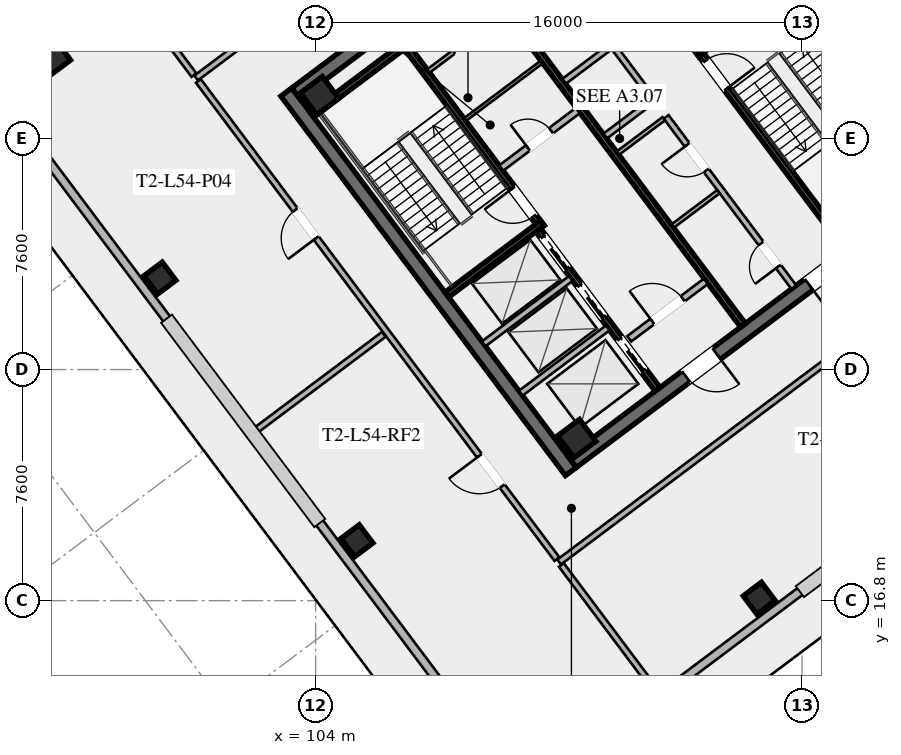
"""IFC4 building model, lengths in metres.
Left out: names, types, materials, properties, quantities, classifications, styles, units other than length and angle.
Written with IfcOpenShell. Run it as: python <this file> out.ifc"""

import sys

from ifc_helpers import new_model, si_unit, direction, frame, frame_2d, origin, origin_2d, place, context, subcontext, project, spatial, rectangle, hollow_rectangle, extrude, element, fill, save


model = new_model("IFC4")
c1 = context("Model", 3, precision=1e-05, world=origin(), true_north=direction((0.0, 1.0)))
c2 = subcontext(c1, "Body", "Model", "MODEL_VIEW")
j1 = project(units=[si_unit("LENGTHUNIT", "METRE"), si_unit("PLANEANGLEUNIT", "RADIAN")], contexts=[c1])
p1 = place(None, origin())
s1 = spatial("IfcSite", under=j1, at=p1, CompositionType="ELEMENT")
p2 = place(p1, origin())
s2 = spatial("IfcBuilding", under=s1, at=p2, CompositionType="ELEMENT")
p3 = place(p2, frame((0.0, 0.0, 199.6)))
s3 = spatial("IfcBuildingStorey", under=s2, at=p3, CompositionType="ELEMENT", Elevation=199.6)
for number, where, z_axis, x_axis in (
    (1, (112.396, 21.047, 0.0), (0.0, 0.0, 1.0), (-0.6, 0.8, 0.0)),
    (2, (115.604, 42.953, 0.0), (0.0, 0.0, 1.0), (0.6, -0.8, 0.0)),
):
    element("IfcWall", number, at=place(p3, frame(where, z_axis=z_axis, x_axis=x_axis)), inside=s3, PredefinedType="SHEAR", context=c2, shape_type="SweptSolid", body=[
        extrude(rectangle(XDim=15.6, YDim=0.45, at=frame_2d((7.8, 0.0))), origin(), (0.0, 0.0, 1.0), 4.6),
    ])
p4 = place(p3, frame((124.649, 30.518, 0.0), z_axis=(0.0, 0.0, 1.0), x_axis=(-0.8, -0.6, 0.0)))
e3 = element("IfcWall", 3, at=p4, inside=s3, PredefinedType="SHEAR", context=c2, shape_type="SweptSolid", body=[
    extrude(rectangle(XDim=15.26, YDim=0.45, at=frame_2d((7.63, 0.0))), origin(), (0.0, 0.0, 1.0), 4.6),
])
p5 = place(p4, frame((9.33, 0.0, 0.0)))
e4 = element("IfcOpeningElement", 4, at=p5, cuts=e3, PredefinedType="OPENING", context=c2, shape_type="SweptSolid", body=[
    extrude(rectangle(XDim=1.25, YDim=2.25, at=frame_2d((0.625, 1.125))), frame((0.0, 0.235, 0.0), z_axis=(0.0, -1.0, 0.0), x_axis=(1.0, 0.0, 0.0)), (0.0, 0.0, 1.0), 0.47),
])
p6 = place(p4, frame((4.28, 0.0, 0.0)))
e5 = element("IfcOpeningElement", 5, at=p6, cuts=e3, PredefinedType="OPENING", context=c2, shape_type="SweptSolid", body=[
    extrude(rectangle(XDim=1.25, YDim=2.25, at=frame_2d((0.625, 1.125))), frame((0.0, 0.235, 0.0), z_axis=(0.0, -1.0, 0.0), x_axis=(1.0, 0.0, 0.0)), (0.0, 0.0, 1.0), 0.47),
])
p7 = place(p3, frame((103.351, 33.482, 0.0), z_axis=(0.0, 0.0, 1.0), x_axis=(0.8, 0.6, 0.0)))
e6 = element("IfcWall", 6, at=p7, inside=s3, PredefinedType="SHEAR", context=c2, shape_type="SweptSolid", body=[
    extrude(rectangle(XDim=15.26, YDim=0.45, at=frame_2d((7.63, 0.0))), origin(), (0.0, 0.0, 1.0), 4.6),
])
p8 = place(p7, frame((4.68, 0.0, 0.0)))
e7 = element("IfcOpeningElement", 7, at=p8, cuts=e6, PredefinedType="OPENING", context=c2, shape_type="SweptSolid", body=[
    extrude(rectangle(XDim=1.25, YDim=2.25, at=frame_2d((0.625, 1.125))), frame((0.0, 0.235, 0.0), z_axis=(0.0, -1.0, 0.0), x_axis=(1.0, 0.0, 0.0)), (0.0, 0.0, 1.0), 0.47),
])
p9 = place(p7, frame((9.73, 0.0, 0.0)))
e8 = element("IfcOpeningElement", 8, at=p9, cuts=e6, PredefinedType="OPENING", context=c2, shape_type="SweptSolid", body=[
    extrude(rectangle(XDim=1.25, YDim=2.25, at=frame_2d((0.625, 1.125))), frame((0.0, 0.235, 0.0), z_axis=(0.0, -1.0, 0.0), x_axis=(1.0, 0.0, 0.0)), (0.0, 0.0, 1.0), 0.47),
])
for number, where, z_axis, x_axis in (
    (9, (112.59, 22.13, 0.0), (0.0, 0.0, 1.0), (0.8, 0.6, 0.0)),
    (10, (104.13, 33.41, 0.0), (0.0, 0.0, 1.0), (0.8, 0.6, 0.0)),
):
    element("IfcColumn", number, at=place(p3, frame(where, z_axis=z_axis, x_axis=x_axis)), inside=s3, PredefinedType="COLUMN", context=c2, shape_type="SweptSolid", body=[
        extrude(hollow_rectangle(XDim=0.9, YDim=0.9, WallThickness=0.04, at=origin_2d()), origin(), (0.0, 0.0, 1.0), 4.42),
    ])
p10 = place(p3, frame((95.24, 34.68, -0.295), z_axis=(0.0, 0.0, 1.0), x_axis=(0.799999996291, 0.600000004945, 0.0)))
e11 = element("IfcColumn", 11, at=p10, inside=s3, PredefinedType="COLUMN", context=c2, shape_type="SweptSolid", body=[
    extrude(hollow_rectangle(XDim=1.0, YDim=1.0, WallThickness=0.04, at=origin_2d()), origin(), (0.0, 0.0, 1.0), 4.715),
])
for number, where, z_axis, x_axis in (
    (12, (118.59, 16.88, -0.295), (0.0, 0.0, 1.0), (0.8, 0.6, 0.0)),
    (13, (98.88, 27.41, -0.295), (0.0, 0.0, 1.0), (0.8, 0.6, 0.0)),
    (14, (105.36, 18.77, -0.295), (0.0, 0.0, 1.0), (0.8, 0.6, 0.0)),
):
    element("IfcColumn", number, at=place(p3, frame(where, z_axis=z_axis, x_axis=x_axis)), inside=s3, PredefinedType="COLUMN", context=c2, shape_type="SweptSolid", body=[
        extrude(hollow_rectangle(XDim=0.75, YDim=0.75, WallThickness=0.032, at=origin_2d()), origin(), (0.0, 0.0, 1.0), 4.715),
    ])
for number, where, z_axis, x_axis in (
    (15, (134.072, 27.704, 0.0), (0.0, 0.0, 1.0), (-0.8, -0.6, 0.0)),
    (16, (109.704, 11.928, 0.0), (0.0, 0.0, 1.0), (-0.6, 0.8, 0.0)),
    (17, (118.296, 52.072, 0.0), (0.0, 0.0, 1.0), (0.6, -0.8, 0.0)),
):
    element("IfcWall", number, at=place(p3, frame(where, z_axis=z_axis, x_axis=x_axis)), inside=s3, PredefinedType="SOLIDWALL", context=c2, shape_type="SweptSolid", body=[
        extrude(rectangle(XDim=26.96, YDim=0.28, at=frame_2d((13.48, 0.0))), origin(), (0.0, 0.0, 1.0), 4.42),
    ])
p11 = place(p3, frame((111.44, 29.08, 0.0), z_axis=(0.0, 0.0, 1.0), x_axis=(-0.59999041401, 0.800007189403, 0.0)))
e18 = element("IfcWall", 18, at=p11, inside=s3, PredefinedType="SHEAR", context=c2, shape_type="SweptSolid", body=[
    extrude(rectangle(XDim=8.15, YDim=0.2, at=frame_2d((4.075, 0.0))), origin(), (0.0, 0.0, 1.0), 4.42),
])
p12 = place(p11, frame((0.45, 0.0, 0.0)))
e19 = element("IfcOpeningElement", 19, at=p12, cuts=e18, PredefinedType="OPENING", context=c2, shape_type="SweptSolid", body=[
    extrude(rectangle(XDim=1.15, YDim=2.2, at=frame_2d((0.575, 1.1))), frame((0.0, 0.11, 0.0), z_axis=(0.0, -1.0, 0.0), x_axis=(1.0, 0.0, 0.0)), (0.0, 0.0, 1.0), 0.22),
])
for number, where, z_axis, x_axis in (
    (20, (108.316, 26.862, 0.0), (0.0, 0.0, 1.0), (0.8, 0.6, 0.0)),
    (21, (103.876, 32.782, 0.0), (0.0, 0.0, 1.0), (0.8, 0.6, 0.0)),
):
    element("IfcWall", number, at=place(p3, frame(where, z_axis=z_axis, x_axis=x_axis)), inside=s3, PredefinedType="SHEAR", context=c2, shape_type="SweptSolid", body=[
        extrude(rectangle(XDim=3.93, YDim=0.2, at=frame_2d((1.965, 0.0))), origin(), (0.0, 0.0, 1.0), 4.42),
    ])
p13 = place(p3, frame((116.56, 34.92, 0.0), z_axis=(0.0, 0.0, 1.0), x_axis=(0.59999041401, -0.800007189403, 0.0)))
e22 = element("IfcWall", 22, at=p13, inside=s3, PredefinedType="SHEAR", context=c2, shape_type="SweptSolid", body=[
    extrude(rectangle(XDim=8.15, YDim=0.2, at=frame_2d((4.075, 0.0))), origin(), (0.0, 0.0, 1.0), 4.42),
])
p14 = place(p13, frame((0.45, 0.0, 0.0)))
e23 = element("IfcOpeningElement", 23, at=p14, cuts=e22, PredefinedType="OPENING", context=c2, shape_type="SweptSolid", body=[
    extrude(rectangle(XDim=1.15, YDim=2.2, at=frame_2d((0.575, 1.1))), frame((0.0, 0.11, 0.0), z_axis=(0.0, -1.0, 0.0), x_axis=(1.0, 0.0, 0.0)), (0.0, 0.0, 1.0), 0.22),
])
p15 = place(p3, frame((116.54, 34.78, 0.0), z_axis=(0.0, 0.0, 1.0), x_axis=(0.800014909178, 0.599980120581, 0.0)))
e24 = element("IfcWall", 24, at=p15, inside=s3, PredefinedType="SHEAR", context=c2, shape_type="SweptSolid", body=[
    extrude(rectangle(XDim=3.93, YDim=0.2, at=frame_2d((1.965, 0.0))), origin(), (0.0, 0.0, 1.0), 4.42),
])
p16 = place(p3, frame((118.058, 25.856, 0.0), z_axis=(0.0, 0.0, 1.0), x_axis=(-0.600002657301, 0.799998007018, 0.0)))
e25 = element("IfcWall", 25, at=p16, inside=s3, PredefinedType="SHEAR", context=c2, shape_type="SweptSolid", body=[
    extrude(rectangle(XDim=14.7, YDim=0.2, at=frame_2d((7.35, 0.0))), origin(), (0.0, 0.0, 1.0), 4.42),
])
p17 = place(p3, frame((110.104, 31.028, 0.0), z_axis=(0.0, 0.0, 1.0), x_axis=(0.800018601094, 0.59997519774, 0.0)))
e26 = element("IfcWall", 26, at=p17, inside=s3, PredefinedType="SOLIDWALL", context=c2, shape_type="SweptSolid", body=[
    extrude(rectangle(XDim=3.15, YDim=0.22, at=frame_2d((1.575, 0.0))), origin(), (0.0, 0.0, 1.0), 3.531),
])
p18 = place(p17, frame((1.1, 0.0, 0.0)))
e27 = element("IfcOpeningElement", 27, at=p18, cuts=e26, PredefinedType="OPENING", context=c2, shape_type="SweptSolid", body=[
    extrude(rectangle(XDim=0.95, YDim=2.05, at=frame_2d((0.475, 1.025))), frame((0.0, 0.12, 0.0), z_axis=(0.0, -1.0, 0.0), x_axis=(1.0, 0.0, 0.0)), (0.0, 0.0, 1.0), 0.24),
])
p19 = place(p3, frame((114.316, 25.412, 0.0), z_axis=(0.0, 0.0, 1.0), x_axis=(0.800018601094, 0.59997519774, 0.0)))
e28 = element("IfcWall", 28, at=p19, inside=s3, PredefinedType="SOLIDWALL", context=c2, shape_type="SweptSolid", body=[
    extrude(rectangle(XDim=3.15, YDim=0.22, at=frame_2d((1.575, 0.0))), origin(), (0.0, 0.0, 1.0), 3.531),
])
p20 = place(p19, frame((0.95, 0.0, 0.0)))
e29 = element("IfcOpeningElement", 29, at=p20, cuts=e28, PredefinedType="OPENING", context=c2, shape_type="SweptSolid", body=[
    extrude(rectangle(XDim=1.25, YDim=2.25, at=frame_2d((0.625, 1.125))), frame((0.0, 0.12, 0.0), z_axis=(0.0, -1.0, 0.0), x_axis=(1.0, 0.0, 0.0)), (0.0, 0.0, 1.0), 0.24),
])
p21 = place(p3, frame((115.25, 23.75, 0.0), z_axis=(0.0, 0.0, 1.0), x_axis=(-0.599994036198, 0.800004472816, 0.0)))
e30 = element("IfcWall", 30, at=p21, inside=s3, PredefinedType="SHEAR", context=c2, shape_type="SweptSolid", body=[
    extrude(rectangle(XDim=6.55, YDim=0.2, at=frame_2d((3.275, 0.0))), origin(), (0.0, 0.0, 1.0), 4.42),
])
p22 = place(p21, frame((4.975, 0.0, 0.0)))
e31 = element("IfcOpeningElement", 31, at=p22, cuts=e30, PredefinedType="OPENING", context=c2, shape_type="SweptSolid", body=[
    extrude(rectangle(XDim=1.3, YDim=2.25, at=frame_2d((0.65, 1.125))), frame((0.0, 0.11, 0.0), z_axis=(0.0, -1.0, 0.0), x_axis=(1.0, 0.0, 0.0)), (0.0, 0.0, 1.0), 0.22),
])
p23 = place(p21, frame((2.975, 0.0, 0.0)))
e32 = element("IfcOpeningElement", 32, at=p23, cuts=e30, PredefinedType="OPENING", context=c2, shape_type="SweptSolid", body=[
    extrude(rectangle(XDim=1.3, YDim=2.25, at=frame_2d((0.65, 1.125))), frame((0.0, 0.11, 0.0), z_axis=(0.0, -1.0, 0.0), x_axis=(1.0, 0.0, 0.0)), (0.0, 0.0, 1.0), 0.22),
])
p24 = place(p21, frame((0.775, 0.0, 0.0)))
e33 = element("IfcOpeningElement", 33, at=p24, cuts=e30, PredefinedType="OPENING", context=c2, shape_type="SweptSolid", body=[
    extrude(rectangle(XDim=1.3, YDim=2.25, at=frame_2d((0.65, 1.125))), frame((0.0, 0.11, 0.0), z_axis=(0.0, -1.0, 0.0), x_axis=(1.0, 0.0, 0.0)), (0.0, 0.0, 1.0), 0.22),
])
for number, where, z_axis, x_axis in (
    (34, (110.746, 23.622, 0.0), (0.0, 0.0, 1.0), (0.8, 0.6, 0.0)),
    (35, (109.528, 25.246, 0.0), (0.0, 0.0, 1.0), (0.8, 0.6, 0.0)),
):
    element("IfcWall", number, at=place(p3, frame(where, z_axis=z_axis, x_axis=x_axis)), inside=s3, PredefinedType="SOLIDWALL", context=c2, shape_type="SweptSolid", body=[
        extrude(rectangle(XDim=3.58, YDim=0.2, at=frame_2d((1.79, 0.0))), origin(), (0.0, 0.0, 1.0), 4.42),
    ])
p25 = place(p3, frame((107.71, 34.22, 0.0), z_axis=(0.0, 0.0, 1.0), x_axis=(0.799981399002, 0.60002480053, 0.0)))
e36 = element("IfcWall", 36, at=p25, inside=s3, PredefinedType="PARTITIONING", context=c2, shape_type="SweptSolid", body=[
    extrude(rectangle(XDim=3.15, YDim=0.135, at=frame_2d((1.575, 0.0))), origin(), (0.0, 0.0, 1.0), 3.531),
])
p26 = place(p25, frame((1.05, 0.0, 0.0)))
e37 = element("IfcOpeningElement", 37, at=p26, cuts=e36, PredefinedType="OPENING", context=c2, shape_type="SweptSolid", body=[
    extrude(rectangle(XDim=1.05, YDim=2.2, at=frame_2d((0.525, 1.1))), frame((0.0, 0.077, 0.0), z_axis=(0.0, -1.0, 0.0), x_axis=(1.0, 0.0, 0.0)), (0.0, 0.0, 1.0), 0.155),
])
p27 = place(p3, frame((108.91, 32.62, 0.0), z_axis=(0.0, 0.0, 1.0), x_axis=(0.800018601094, 0.59997519774, 0.0)))
e38 = element("IfcWall", 38, at=p27, inside=s3, PredefinedType="PARTITIONING", context=c2, shape_type="SweptSolid", body=[
    extrude(rectangle(XDim=3.15, YDim=0.11, at=frame_2d((1.575, 0.0))), origin(), (0.0, 0.0, 1.0), 3.531),
])
p28 = place(p3, frame((119.73, 27.11, 0.0), z_axis=(0.0, 0.0, 1.0), x_axis=(-0.600005580459, 0.799995814625, 0.0)))
e39 = element("IfcWall", 39, at=p28, inside=s3, PredefinedType="SOLIDWALL", context=c2, shape_type="SweptSolid", body=[
    extrude(rectangle(XDim=7.0, YDim=0.2, at=frame_2d((3.5, 0.0))), origin(), (0.0, 0.0, 1.0), 3.531),
])
p29 = place(p28, frame((0.85, 0.0, 0.0)))
e40 = element("IfcOpeningElement", 40, at=p29, cuts=e39, PredefinedType="OPENING", context=c2, shape_type="SweptSolid", body=[
    extrude(rectangle(XDim=0.95, YDim=2.05, at=frame_2d((0.475, 1.025))), frame((0.0, 0.11, 0.0), z_axis=(0.0, -1.0, 0.0), x_axis=(1.0, 0.0, 0.0)), (0.0, 0.0, 1.0), 0.22),
])
p30 = place(p28, frame((4.8, 0.0, 0.0)))
e41 = element("IfcOpeningElement", 41, at=p30, cuts=e39, PredefinedType="OPENING", context=c2, shape_type="SweptSolid", body=[
    extrude(rectangle(XDim=1.05, YDim=2.2, at=frame_2d((0.525, 1.1))), frame((0.0, 0.11, 0.0), z_axis=(0.0, -1.0, 0.0), x_axis=(1.0, 0.0, 0.0)), (0.0, 0.0, 1.0), 0.22),
])
for number, where, z_axis, x_axis in (
    (42, (113.946, 31.522, 0.0), (0.0, 0.0, 1.0), (0.8, 0.6, 0.0)),
    (43, (115.746, 29.122, 0.0), (0.0, 0.0, 1.0), (0.8, 0.6, 0.0)),
):
    element("IfcWall", number, at=place(p3, frame(where, z_axis=z_axis, x_axis=x_axis)), inside=s3, PredefinedType="PARTITIONING", context=c2, shape_type="SweptSolid", body=[
        extrude(rectangle(XDim=1.88, YDim=0.135, at=frame_2d((0.94, 0.0))), origin(), (0.0, 0.0, 1.0), 3.531),
    ])
p31 = place(p3, frame((115.11, 33.27, 0.0), z_axis=(0.0, 0.0, 1.0), x_axis=(-0.600011160345, 0.79999162962, 0.0)))
e44 = element("IfcWall", 44, at=p31, inside=s3, PredefinedType="SOLIDWALL", context=c2, shape_type="SweptSolid", body=[
    extrude(rectangle(XDim=7.0, YDim=0.2, at=frame_2d((3.5, 0.0))), origin(), (0.0, 0.0, 1.0), 4.42),
])
p32 = place(p3, frame((113.526, 32.082, 0.0), z_axis=(0.0, 0.0, 1.0), x_axis=(0.800046745961, 0.599937666993, 0.0)))
e45 = element("IfcWall", 45, at=p32, inside=s3, PredefinedType="SOLIDWALL", context=c2, shape_type="SweptSolid", body=[
    extrude(rectangle(XDim=1.88, YDim=0.2, at=frame_2d((0.94, 0.0))), origin(), (0.0, 0.0, 1.0), 4.42),
])
p33 = place(p3, frame((112.176, 33.882, 0.0), z_axis=(0.0, 0.0, 1.0), x_axis=(0.8, 0.6, 0.0)))
e46 = element("IfcWall", 46, at=p33, inside=s3, PredefinedType="SOLIDWALL", context=c2, shape_type="SweptSolid", body=[
    extrude(rectangle(XDim=1.88, YDim=0.2, at=frame_2d((0.94, 0.0))), origin(), (0.0, 0.0, 1.0), 4.42),
])
p34 = place(p3, frame((100.07, 33.99, 0.0), z_axis=(0.0, 0.0, 1.0), x_axis=(0.8, 0.6, 0.0)))
e47 = element("IfcWall", 47, at=p34, inside=s3, PredefinedType="SOLIDWALL", context=c2, shape_type="SweptSolid", body=[
    extrude(rectangle(XDim=19.9, YDim=0.2, at=frame_2d((9.95, 0.0))), origin(), (0.0, 0.0, 1.0), 3.531),
])
p35 = place(p34, frame((2.2, 0.0, 0.0)))
e48 = element("IfcOpeningElement", 48, at=p35, cuts=e47, PredefinedType="OPENING", context=c2, shape_type="SweptSolid", body=[
    extrude(rectangle(XDim=1.15, YDim=2.2, at=frame_2d((0.575, 1.1))), frame((0.0, 0.11, 0.0), z_axis=(0.0, -1.0, 0.0), x_axis=(1.0, 0.0, 0.0)), (0.0, 0.0, 1.0), 0.22),
])
p36 = place(p3, frame((127.93, 30.01, 0.0), z_axis=(0.0, 0.0, 1.0), x_axis=(-0.8, -0.6, 0.0)))
e49 = element("IfcWall", 49, at=p36, inside=s3, PredefinedType="SOLIDWALL", context=c2, shape_type="SweptSolid", body=[
    extrude(rectangle(XDim=19.9, YDim=0.2, at=frame_2d((9.95, 0.0))), origin(), (0.0, 0.0, 1.0), 3.531),
])
p37 = place(p36, frame((2.2, 0.0, 0.0)))
e50 = element("IfcOpeningElement", 50, at=p37, cuts=e49, PredefinedType="OPENING", context=c2, shape_type="SweptSolid", body=[
    extrude(rectangle(XDim=1.15, YDim=2.2, at=frame_2d((0.575, 1.1))), frame((0.0, 0.11, 0.0), z_axis=(0.0, -1.0, 0.0), x_axis=(1.0, 0.0, 0.0)), (0.0, 0.0, 1.0), 0.22),
])
p38 = place(p3, frame((111.938, 18.166, 0.0), z_axis=(0.0, 0.0, 1.0), x_axis=(-0.59999602618, 0.80000298035, 0.0)))
e51 = element("IfcWall", 51, at=p38, inside=s3, PredefinedType="SOLIDWALL", context=c2, shape_type="SweptSolid", body=[
    extrude(rectangle(XDim=19.66, YDim=0.2, at=frame_2d((9.83, 0.0))), origin(), (0.0, 0.0, 1.0), 3.531),
])
p39 = place(p38, frame((3.0, 0.0, 0.0)))
e52 = element("IfcOpeningElement", 52, at=p39, cuts=e51, PredefinedType="OPENING", context=c2, shape_type="SweptSolid", body=[
    extrude(rectangle(XDim=1.25, YDim=2.25, at=frame_2d((0.625, 1.125))), frame((0.0, 0.11, 0.0), z_axis=(0.0, -1.0, 0.0), x_axis=(1.0, 0.0, 0.0)), (0.0, 0.0, 1.0), 0.22),
])
p40 = place(p38, frame((13.2, 0.0, 0.0)))
e53 = element("IfcOpeningElement", 53, at=p40, cuts=e51, PredefinedType="OPENING", context=c2, shape_type="SweptSolid", body=[
    extrude(rectangle(XDim=1.15, YDim=2.2, at=frame_2d((0.575, 1.1))), frame((0.0, 0.11, 0.0), z_axis=(0.0, -1.0, 0.0), x_axis=(1.0, 0.0, 0.0)), (0.0, 0.0, 1.0), 0.22),
])
p41 = place(p3, frame((99.998, 34.086, 0.0), z_axis=(0.0, 0.0, 1.0), x_axis=(-0.6, 0.8, 0.0)))
e54 = element("IfcWall", 54, at=p41, inside=s3, PredefinedType="SOLIDWALL", context=c2, shape_type="SweptSolid", body=[
    extrude(rectangle(XDim=5.41, YDim=0.2, at=frame_2d((2.705, 0.0))), origin(), (0.0, 0.0, 1.0), 3.531),
])
for number, where, z_axis, x_axis in (
    (55, (112.082, 17.974, 0.0), (0.0, 0.0, 1.0), (0.6, -0.8, 0.0)),
    (56, (101.916, 22.312, 0.0), (0.0, 0.0, 1.0), (0.8, 0.6, 0.0)),
):
    element("IfcWall", number, at=place(p3, frame(where, z_axis=z_axis, x_axis=x_axis)), inside=s3, PredefinedType="SOLIDWALL", context=c2, shape_type="SweptSolid", body=[
        extrude(rectangle(XDim=5.41, YDim=0.2, at=frame_2d((2.705, 0.0))), origin(), (0.0, 0.0, 1.0), 3.531),
    ])
p42 = place(p5, origin())
e57 = element("IfcDoor", 57, at=p42, inside=s3, OperationType="SINGLE_SWING_LEFT", PredefinedType="DOOR", context=c2, shape_type="SweptSolid", body=[
    extrude(rectangle(XDim=1.25, YDim=2.25, at=frame_2d((0.625, 1.125))), frame((0.0, 0.025, 0.0), z_axis=(0.0, -1.0, 0.0), x_axis=(1.0, 0.0, 0.0)), (0.0, 0.0, 1.0), 0.05),
])
fill(e4, e57)
p43 = place(p6, origin())
e58 = element("IfcDoor", 58, at=p43, inside=s3, OperationType="SINGLE_SWING_RIGHT", PredefinedType="DOOR", context=c2, shape_type="SweptSolid", body=[
    extrude(rectangle(XDim=1.25, YDim=2.25, at=frame_2d((0.625, 1.125))), frame((0.0, 0.025, 0.0), z_axis=(0.0, -1.0, 0.0), x_axis=(1.0, 0.0, 0.0)), (0.0, 0.0, 1.0), 0.05),
])
fill(e5, e58)
p44 = place(p12, origin())
e59 = element("IfcDoor", 59, at=p44, inside=s3, OperationType="SINGLE_SWING_RIGHT", PredefinedType="DOOR", context=c2, shape_type="SweptSolid", body=[
    extrude(rectangle(XDim=1.15, YDim=2.2, at=frame_2d((0.575, 1.1))), frame((0.0, 0.025, 0.0), z_axis=(0.0, -1.0, 0.0), x_axis=(1.0, 0.0, 0.0)), (0.0, 0.0, 1.0), 0.05),
])
fill(e19, e59)
p45 = place(p14, origin())
e60 = element("IfcDoor", 60, at=p45, inside=s3, OperationType="SINGLE_SWING_RIGHT", PredefinedType="DOOR", context=c2, shape_type="SweptSolid", body=[
    extrude(rectangle(XDim=1.15, YDim=2.2, at=frame_2d((0.575, 1.1))), frame((0.0, 0.025, 0.0), z_axis=(0.0, -1.0, 0.0), x_axis=(1.0, 0.0, 0.0)), (0.0, 0.0, 1.0), 0.05),
])
fill(e23, e60)
p46 = place(p20, origin())
e61 = element("IfcDoor", 61, at=p46, inside=s3, OperationType="SINGLE_SWING_LEFT", PredefinedType="DOOR", context=c2, shape_type="SweptSolid", body=[
    extrude(rectangle(XDim=1.25, YDim=2.25, at=frame_2d((0.625, 1.125))), frame((0.0, 0.025, 0.0), z_axis=(0.0, -1.0, 0.0), x_axis=(1.0, 0.0, 0.0)), (0.0, 0.0, 1.0), 0.05),
])
fill(e29, e61)
p47 = place(p18, origin())
e62 = element("IfcDoor", 62, at=p47, inside=s3, OperationType="SINGLE_SWING_LEFT", PredefinedType="DOOR", context=c2, shape_type="SweptSolid", body=[
    extrude(rectangle(XDim=0.95, YDim=2.05, at=frame_2d((0.475, 1.025))), frame((0.0, 0.025, 0.0), z_axis=(0.0, -1.0, 0.0), x_axis=(1.0, 0.0, 0.0)), (0.0, 0.0, 1.0), 0.05),
])
fill(e27, e62)
p48 = place(p29, origin())
e63 = element("IfcDoor", 63, at=p48, inside=s3, OperationType="SINGLE_SWING_LEFT", PredefinedType="DOOR", context=c2, shape_type="SweptSolid", body=[
    extrude(rectangle(XDim=0.95, YDim=2.05, at=frame_2d((0.475, 1.025))), frame((0.0, 0.025, 0.0), z_axis=(0.0, -1.0, 0.0), x_axis=(1.0, 0.0, 0.0)), (0.0, 0.0, 1.0), 0.05),
])
fill(e40, e63)
p49 = place(p30, origin())
e64 = element("IfcDoor", 64, at=p49, inside=s3, OperationType="SINGLE_SWING_RIGHT", PredefinedType="DOOR", context=c2, shape_type="SweptSolid", body=[
    extrude(rectangle(XDim=1.05, YDim=2.2, at=frame_2d((0.525, 1.1))), frame((0.0, 0.025, 0.0), z_axis=(0.0, -1.0, 0.0), x_axis=(1.0, 0.0, 0.0)), (0.0, 0.0, 1.0), 0.05),
])
fill(e41, e64)
p50 = place(p39, origin())
e65 = element("IfcDoor", 65, at=p50, inside=s3, OperationType="SINGLE_SWING_RIGHT", PredefinedType="DOOR", context=c2, shape_type="SweptSolid", body=[
    extrude(rectangle(XDim=1.25, YDim=2.25, at=frame_2d((0.625, 1.125))), frame((0.0, 0.025, 0.0), z_axis=(0.0, -1.0, 0.0), x_axis=(1.0, 0.0, 0.0)), (0.0, 0.0, 1.0), 0.05),
])
fill(e52, e65)
p51 = place(p40, origin())
e66 = element("IfcDoor", 66, at=p51, inside=s3, OperationType="SINGLE_SWING_LEFT", PredefinedType="DOOR", context=c2, shape_type="SweptSolid", body=[
    extrude(rectangle(XDim=1.15, YDim=2.2, at=frame_2d((0.575, 1.1))), frame((0.0, 0.025, 0.0), z_axis=(0.0, -1.0, 0.0), x_axis=(1.0, 0.0, 0.0)), (0.0, 0.0, 1.0), 0.05),
])
fill(e53, e66)
p52 = place(p22, origin())
e67 = element("IfcDoor", 67, at=p52, inside=s3, OperationType="SLIDING_TO_LEFT", PredefinedType="DOOR", context=c2, shape_type="SweptSolid", body=[
    extrude(rectangle(XDim=1.3, YDim=2.25, at=frame_2d((0.65, 1.125))), frame((0.0, 0.025, 0.0), z_axis=(0.0, -1.0, 0.0), x_axis=(1.0, 0.0, 0.0)), (0.0, 0.0, 1.0), 0.05),
])
fill(e31, e67)
p53 = place(p23, origin())
e68 = element("IfcDoor", 68, at=p53, inside=s3, OperationType="SLIDING_TO_LEFT", PredefinedType="DOOR", context=c2, shape_type="SweptSolid", body=[
    extrude(rectangle(XDim=1.3, YDim=2.25, at=frame_2d((0.65, 1.125))), frame((0.0, 0.025, 0.0), z_axis=(0.0, -1.0, 0.0), x_axis=(1.0, 0.0, 0.0)), (0.0, 0.0, 1.0), 0.05),
])
fill(e32, e68)
p54 = place(p24, origin())
e69 = element("IfcDoor", 69, at=p54, inside=s3, OperationType="SLIDING_TO_LEFT", PredefinedType="DOOR", context=c2, shape_type="SweptSolid", body=[
    extrude(rectangle(XDim=1.3, YDim=2.25, at=frame_2d((0.65, 1.125))), frame((0.0, 0.025, 0.0), z_axis=(0.0, -1.0, 0.0), x_axis=(1.0, 0.0, 0.0)), (0.0, 0.0, 1.0), 0.05),
])
fill(e33, e69)
save(model, sys.argv[1])
